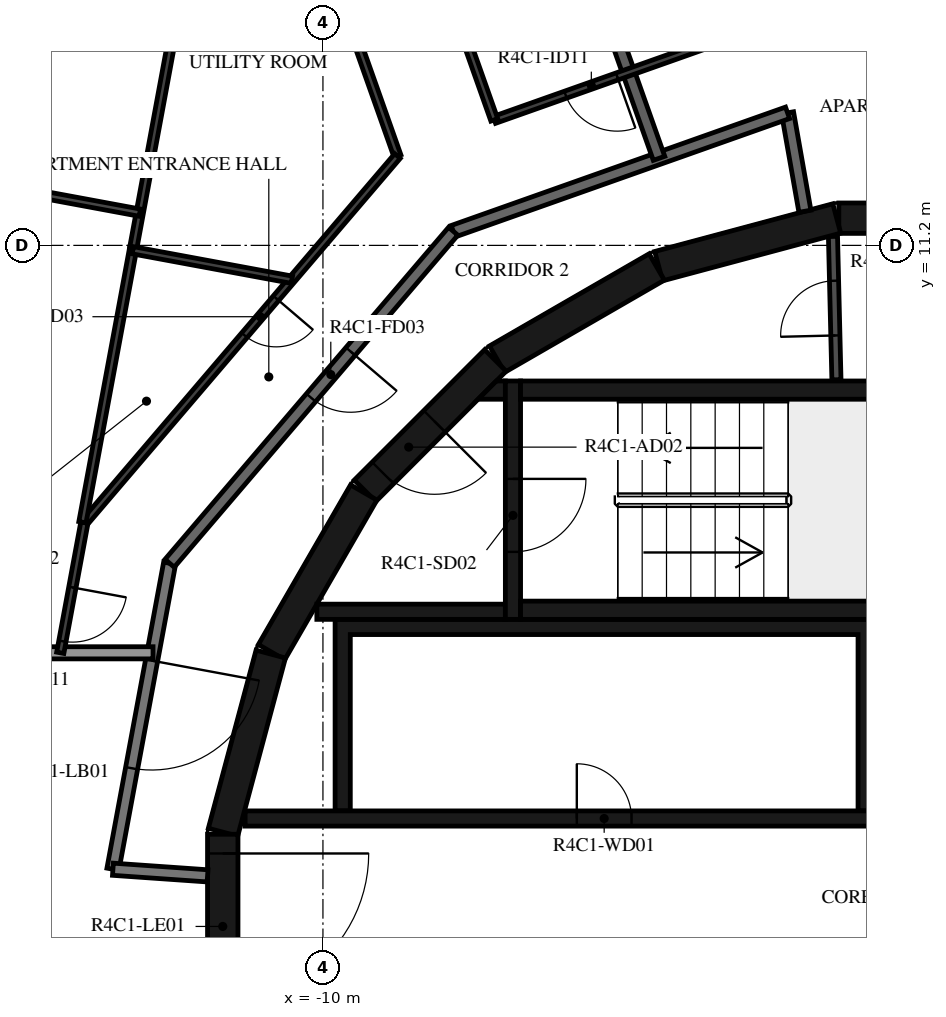
"""IFC4 building model, lengths in metres.
Left out: names, types, materials, properties, quantities, classifications, styles, units other than length and angle.
Written with IfcOpenShell. Run it as: python <this file> out.ifc"""

import sys

from ifc_helpers import new_model, si_unit, direction, frame, frame_2d, origin, place, context, subcontext, project, spatial, polyline, rectangle, outline, extrude, element, fill, save


model = new_model("IFC4")
c1 = context("Model", 3, precision=1e-05, world=origin(), true_north=direction((0.0, 1.0)))
c2 = subcontext(c1, "Body", "Model", "MODEL_VIEW")
j1 = project(units=[si_unit("LENGTHUNIT", "METRE"), si_unit("PLANEANGLEUNIT", "RADIAN")], contexts=[c1])
p1 = place(None, origin())
s1 = spatial("IfcSite", under=j1, at=p1, CompositionType="ELEMENT")
p2 = place(p1, origin())
s2 = spatial("IfcBuilding", under=s1, at=p2, CompositionType="ELEMENT")
p3 = place(p2, frame((0.0, 0.0, 176.2)))
s3 = spatial("IfcBuildingStorey", under=s2, at=p3, CompositionType="ELEMENT", Elevation=176.2)
for number, where, z_axis, x_axis in (
    (1, (1.516, 11.647, 0.0), (0.0, 0.0, 1.0), (-1.0, 0.0, 0.0)),
    (2, (-1.55, 11.643, 0.0), (0.0, 0.0, 1.0), (-0.966, -0.259, 0.0)),
    (3, (-4.51, 10.845, 0.0), (0.0, 0.0, 1.0), (-0.866, -0.5, 0.0)),
):
    element("IfcWall", number, at=place(p3, frame(where, z_axis=z_axis, x_axis=x_axis)), inside=s3, PredefinedType="SHEAR", context=c2, shape_type="SweptSolid", body=[
        extrude(rectangle(XDim=3.033, YDim=0.5, at=frame_2d((1.516, 0.0))), origin(), (0.0, 0.0, 1.0), 3.12),
    ])
p4 = place(p3, frame((-7.164, 9.308, 0.0), z_axis=(0.0, 0.0, 1.0), x_axis=(-0.707106781187, -0.707106781187, 0.0)))
e4 = element("IfcWall", 4, at=p4, inside=s3, PredefinedType="SHEAR", context=c2, shape_type="SweptSolid", body=[
    extrude(rectangle(XDim=3.032, YDim=0.5, at=frame_2d((1.516, 0.0))), origin(), (0.0, 0.0, 1.0), 3.12),
])
p5 = place(p4, frame((1.416, 0.0, 0.0)))
e5 = element("IfcOpeningElement", 5, at=p5, cuts=e4, PredefinedType="OPENING", context=c2, shape_type="SweptSolid", body=[
    extrude(rectangle(XDim=1.2, YDim=2.1, at=frame_2d((0.6, 1.05))), frame((0.0, 0.26, 0.0), z_axis=(0.0, -1.0, 0.0), x_axis=(1.0, 0.0, 0.0)), (0.0, 0.0, 1.0), 0.52),
])
for number, where, z_axis, x_axis in (
    (6, (-9.329, 7.137, 0.0), (0.0, 0.0, 1.0), (-0.5, -0.866, 0.0)),
    (7, (-10.858, 4.479, 0.0), (0.0, 0.0, 1.0), (-0.259, -0.966, 0.0)),
):
    element("IfcWall", number, at=place(p3, frame(where, z_axis=z_axis, x_axis=x_axis)), inside=s3, PredefinedType="SHEAR", context=c2, shape_type="SweptSolid", body=[
        extrude(rectangle(XDim=3.033, YDim=0.5, at=frame_2d((1.516, 0.0))), origin(), (0.0, 0.0, 1.0), 3.12),
    ])
p6 = place(p3, frame((-11.647, 1.516, 0.0), z_axis=(0.0, 0.0, 1.0), x_axis=(0.0, -1.0, 0.0)))
e8 = element("IfcWall", 8, at=p6, inside=s3, PredefinedType="SHEAR", context=c2, shape_type="SweptSolid", body=[
    extrude(rectangle(XDim=3.033, YDim=0.5, at=frame_2d((1.516, 0.0))), origin(), (0.0, 0.0, 1.0), 3.12),
])
p7 = place(p6, frame((0.316, 0.0, 0.0)))
e9 = element("IfcOpeningElement", 9, at=p7, cuts=e8, PredefinedType="OPENING", context=c2, shape_type="SweptSolid", body=[
    extrude(rectangle(XDim=2.4, YDim=2.1, at=frame_2d((1.2, 1.05))), frame((0.0, 0.26, 0.0), z_axis=(0.0, -1.0, 0.0), x_axis=(1.0, 0.0, 0.0)), (0.0, 0.0, 1.0), 0.52),
])
for number, where, z_axis, x_axis in (
    (10, (-6.75, 5.2, 0.0), (0.0, 0.0, 1.0), (1.0, 0.0, 0.0)),
    (11, (-6.75, 8.82, 0.0), (0.0, 0.0, 1.0), (1.0, 0.0, 0.0)),
):
    element("IfcWall", number, at=place(p3, frame(where, z_axis=z_axis, x_axis=x_axis)), inside=s3, PredefinedType="SHEAR", context=c2, shape_type="SweptSolid", body=[
        extrude(rectangle(XDim=6.75, YDim=0.3, at=frame_2d((3.375, 0.0))), origin(), (0.0, 0.0, 1.0), 3.12),
    ])
p8 = place(p3, frame((-6.875, 8.97, 0.0), z_axis=(0.0, 0.0, 1.0), x_axis=(0.0, -1.0, 0.0)))
e12 = element("IfcWall", 12, at=p8, inside=s3, PredefinedType="SHEAR", context=c2, shape_type="SweptSolid", body=[
    extrude(rectangle(XDim=3.92, YDim=0.25, at=frame_2d((1.96, 0.0))), origin(), (0.0, 0.0, 1.0), 3.12),
])
p9 = place(p8, frame((1.61, 0.0, 0.0)))
e13 = element("IfcOpeningElement", 13, at=p9, cuts=e12, PredefinedType="OPENING", context=c2, shape_type="SweptSolid", body=[
    extrude(rectangle(XDim=1.2, YDim=2.1, at=frame_2d((0.6, 1.05))), frame((0.0, 0.135, 0.0), z_axis=(0.0, -1.0, 0.0), x_axis=(1.0, 0.0, 0.0)), (0.0, 0.0, 1.0), 0.27),
])
p10 = place(p3, frame((-7.0, 5.175, 0.0), z_axis=(0.0, 0.0, 1.0), x_axis=(-1.0, 0.0, 0.0)))
e14 = element("IfcWall", 14, at=p10, inside=s3, PredefinedType="SHEAR", context=c2, shape_type="SweptSolid", body=[
    extrude(rectangle(XDim=3.1, YDim=0.25, at=frame_2d((1.55, 0.0))), origin(), (0.0, 0.0, 1.0), 3.12),
])
p11 = place(p3, origin())
e15 = element("IfcWall", 15, at=p11, inside=s3, PredefinedType="SHEAR", context=c2, shape_type="SweptSolid", body=[
    extrude(outline(polyline([(-7.148, 8.97), (-7.0, 8.97), (-7.0, 8.67), (-7.448, 8.67), (-7.148, 8.97)])), origin(), (0.0, 0.0, 1.0), 3.12),
])
p12 = place(p3, origin())
e16 = element("IfcWall", 16, at=p12, inside=s3, PredefinedType="SHEAR", context=c2, shape_type="SweptSolid", body=[
    extrude(outline(polyline([(-9.55, 4.8), (-1.2, 4.8), (-1.2, 1.9), (-0.95, 1.9), (-0.95, 4.8), (0.95, 4.8), (0.95, 1.9), (1.2, 1.9), (1.2, 4.8), (3.1, 4.8), (3.1, 1.9), (3.35, 1.9), (3.35, 4.8), (5.25, 4.8), (5.25, 1.9), (5.5, 1.9), (5.5, 4.8), (7.4, 4.8), (7.4, 1.9), (7.65, 1.9), (7.65, 4.8), (9.55, 4.8), (9.55, 1.9), (9.8, 1.9), (9.8, 4.8), (9.8, 5.05), (-9.8, 5.05), (-9.8, 4.8), (-9.8, 1.9), (-9.55, 1.9), (-9.55, 4.8)])), origin(), (0.0, 0.0, 1.0), 3.12),
])
p13 = place(p3, frame((-11.28, 1.775, 0.0), z_axis=(0.0, 0.0, 1.0), x_axis=(1.0, 0.0, 0.0)))
e17 = element("IfcWall", 17, at=p13, inside=s3, PredefinedType="SHEAR", context=c2, shape_type="SweptSolid", body=[
    extrude(rectangle(XDim=14.38, YDim=0.25, at=frame_2d((7.19, 0.0))), origin(), (0.0, 0.0, 1.0), 3.12),
])
p14 = place(p13, frame((10.73, 0.0, 0.0)))
e18 = element("IfcOpeningElement", 18, at=p14, cuts=e17, PredefinedType="OPENING", context=c2, shape_type="SweptSolid", body=[
    extrude(rectangle(XDim=1.1, YDim=2.1, at=frame_2d((0.55, 1.05))), frame((0.0, 0.135, 0.0), z_axis=(0.0, -1.0, 0.0), x_axis=(1.0, 0.0, 0.0)), (0.0, 0.0, 1.0), 0.27),
])
p15 = place(p13, frame((12.88, 0.0, 0.0)))
e19 = element("IfcOpeningElement", 19, at=p15, cuts=e17, PredefinedType="OPENING", context=c2, shape_type="SweptSolid", body=[
    extrude(rectangle(XDim=1.1, YDim=2.1, at=frame_2d((0.55, 1.05))), frame((0.0, 0.135, 0.0), z_axis=(0.0, -1.0, 0.0), x_axis=(1.0, 0.0, 0.0)), (0.0, 0.0, 1.0), 0.27),
])
p16 = place(p13, frame((5.455, 0.0, 0.0)))
e20 = element("IfcOpeningElement", 20, at=p16, cuts=e17, PredefinedType="OPENING", context=c2, shape_type="SweptSolid", body=[
    extrude(rectangle(XDim=0.9, YDim=2.1, at=frame_2d((0.45, 1.05))), frame((0.0, 0.135, 0.0), z_axis=(0.0, -1.0, 0.0), x_axis=(1.0, 0.0, 0.0)), (0.0, 0.0, 1.0), 0.27),
])
p17 = place(p3, frame((-1.555, 8.99, 0.0), z_axis=(0.0, 0.0, 1.0), x_axis=(-0.024125549686, 0.999708936567, 0.0)))
e21 = element("IfcWall", 21, at=p17, inside=s3, PredefinedType="PARTITIONING", context=c2, shape_type="SweptSolid", body=[
    extrude(rectangle(XDim=2.358, YDim=0.15, at=frame_2d((1.179, 0.0))), origin(), (0.0, 0.0, 1.0), 3.12),
])
p18 = place(p17, frame((0.729, 0.0, 0.0)))
e22 = element("IfcOpeningElement", 22, at=p18, cuts=e21, PredefinedType="OPENING", context=c2, shape_type="SweptSolid", body=[
    extrude(rectangle(XDim=0.9, YDim=2.1, at=frame_2d((0.45, 1.05))), frame((0.0, 0.085, 0.0), z_axis=(0.0, -1.0, 0.0), x_axis=(1.0, 0.0, 0.0)), (0.0, 0.0, 1.0), 0.17),
])
p19 = place(p3, frame((-12.521, 5.972, 0.0), z_axis=(0.0, 0.0, 1.0), x_axis=(-0.182251559718, -0.983251935661, 0.0)))
e23 = element("IfcWall", 23, at=p19, inside=s3, PredefinedType="STANDARD", context=c2, shape_type="SweptSolid", body=[
    extrude(rectangle(XDim=5.117, YDim=0.2, at=frame_2d((2.559, 0.0))), origin(), (0.0, 0.0, 1.0), 3.12),
])
p20 = place(p19, frame((1.627, 0.0, 0.0)))
e24 = element("IfcOpeningElement", 24, at=p20, cuts=e23, PredefinedType="OPENING", context=c2, shape_type="SweptSolid", body=[
    extrude(rectangle(XDim=1.8, YDim=2.1, at=frame_2d((0.9, 1.05))), frame((0.0, 0.11, 0.0), z_axis=(0.0, -1.0, 0.0), x_axis=(1.0, 0.0, 0.0)), (0.0, 0.0, 1.0), 0.22),
])
p21 = place(p3, frame((-13.454, 0.941, 0.0), z_axis=(0.0, 0.0, 1.0), x_axis=(0.99755155062, -0.069934997354, 0.0)))
e25 = element("IfcWall", 25, at=p21, inside=s3, PredefinedType="STANDARD", context=c2, shape_type="SweptSolid", body=[
    extrude(rectangle(XDim=1.561, YDim=0.2, at=frame_2d((0.78, 0.0))), origin(), (0.0, 0.0, 1.0), 3.12),
])
p22 = place(p3, frame((-2.074, 11.761, 0.0), z_axis=(0.0, 0.0, 1.0), x_axis=(-0.1736412798, 0.984808969267, 0.0)))
e26 = element("IfcWall", 26, at=p22, inside=s3, PredefinedType="STANDARD", context=c2, shape_type="SweptSolid", body=[
    extrude(rectangle(XDim=1.644, YDim=0.2, at=frame_2d((0.822, 0.0))), origin(), (0.0, 0.0, 1.0), 3.12),
])
p23 = place(p3, frame((-2.359, 13.38, 0.0), z_axis=(0.0, 0.0, 1.0), x_axis=(-0.942647529236, -0.333789807551, 0.0)))
e27 = element("IfcWall", 27, at=p23, inside=s3, PredefinedType="STANDARD", context=c2, shape_type="SweptSolid", body=[
    extrude(rectangle(XDim=5.833, YDim=0.2, at=frame_2d((2.917, 0.0))), origin(), (0.0, 0.0, 1.0), 3.12),
])
p24 = place(p3, frame((-7.858, 11.433, 0.0), z_axis=(0.0, 0.0, 1.0), x_axis=(-0.649440801937, -0.760412154545, 0.0)))
e28 = element("IfcWall", 28, at=p24, inside=s3, PredefinedType="STANDARD", context=c2, shape_type="SweptSolid", body=[
    extrude(rectangle(XDim=7.181, YDim=0.2, at=frame_2d((3.59, 0.0))), origin(), (0.0, 0.0, 1.0), 3.12),
])
p25 = place(p24, frame((2.6, 0.0, 0.0)))
e29 = element("IfcOpeningElement", 29, at=p25, cuts=e28, PredefinedType="OPENING", context=c2, shape_type="SweptSolid", body=[
    extrude(rectangle(XDim=1.0, YDim=2.1, at=frame_2d((0.5, 1.05))), frame((0.0, 0.11, 0.0), z_axis=(0.0, -1.0, 0.0), x_axis=(1.0, 0.0, 0.0)), (0.0, 0.0, 1.0), 0.22),
])
p26 = place(p3, frame((-12.794, 4.5, 0.0), z_axis=(0.0, 0.0, 1.0), x_axis=(-1.0, 0.0, 0.0)))
e30 = element("IfcWall", 30, at=p26, inside=s3, PredefinedType="STANDARD", context=c2, shape_type="SweptSolid", body=[
    extrude(rectangle(XDim=5.106, YDim=0.2, at=frame_2d((2.553, 0.0))), origin(), (0.0, 0.0, 1.0), 2.73),
])
p27 = place(p3, frame((-5.839, 16.488, 0.0), z_axis=(0.0, 0.0, 1.0), x_axis=(0.333840515054, -0.942629572265, 0.0)))
e31 = element("IfcWall", 31, at=p27, inside=s3, PredefinedType="STANDARD", context=c2, shape_type="SweptSolid", body=[
    extrude(rectangle(XDim=4.092, YDim=0.2, at=frame_2d((2.046, 0.0))), origin(), (0.0, 0.0, 1.0), 3.12),
])
p28 = place(p3, frame((8.702, 12.206, 0.0), z_axis=(0.0, 0.0, 1.0), x_axis=(-0.760401313718, 0.649453494945, 0.0)))
e32 = element("IfcWall", 32, at=p28, inside=s3, PredefinedType="PARTITIONING", context=c2, shape_type="SweptSolid", body=[
    extrude(rectangle(XDim=16.724, YDim=0.12, at=frame_2d((8.362, 0.0))), origin(), (0.0, 0.0, 1.0), 3.12),
])
p29 = place(p28, frame((0.2, 0.0, 0.0)))
e33 = element("IfcOpeningElement", 33, at=p29, cuts=e32, PredefinedType="OPENING", context=c2, shape_type="SweptSolid", body=[
    extrude(rectangle(XDim=0.9, YDim=2.1, at=frame_2d((0.45, 1.05))), frame((0.0, 0.07, 0.0), z_axis=(0.0, -1.0, 0.0), x_axis=(1.0, 0.0, 0.0)), (0.0, 0.0, 1.0), 0.14),
])
p30 = place(p28, frame((8.02, 0.0, 0.0)))
e34 = element("IfcOpeningElement", 34, at=p30, cuts=e32, PredefinedType="OPENING", context=c2, shape_type="SweptSolid", body=[
    extrude(rectangle(XDim=0.9, YDim=2.1, at=frame_2d((0.45, 1.05))), frame((0.0, 0.07, 0.0), z_axis=(0.0, -1.0, 0.0), x_axis=(1.0, 0.0, 0.0)), (0.0, 0.0, 1.0), 0.14),
])
p31 = place(p28, frame((14.412, 0.0, 0.0)))
e35 = element("IfcOpeningElement", 35, at=p31, cuts=e32, PredefinedType="OPENING", context=c2, shape_type="SweptSolid", body=[
    extrude(rectangle(XDim=0.9, YDim=2.1, at=frame_2d((0.45, 1.05))), frame((0.0, 0.07, 0.0), z_axis=(0.0, -1.0, 0.0), x_axis=(1.0, 0.0, 0.0)), (0.0, 0.0, 1.0), 0.14),
])
p32 = place(p3, frame((6.641, 13.923, 0.0), z_axis=(0.0, 0.0, 1.0), x_axis=(-0.983250157272, 0.182261153912, 0.0)))
e36 = element("IfcWall", 36, at=p32, inside=s3, PredefinedType="PARTITIONING", context=c2, shape_type="SweptSolid", body=[
    extrude(rectangle(XDim=7.985, YDim=0.12, at=frame_2d((3.992, 0.0))), origin(), (0.0, 0.0, 1.0), 3.12),
])
p33 = place(p32, frame((1.4, 0.0, 0.0)))
e37 = element("IfcOpeningElement", 37, at=p33, cuts=e36, PredefinedType="OPENING", context=c2, shape_type="SweptSolid", body=[
    extrude(rectangle(XDim=0.8, YDim=2.1, at=frame_2d((0.4, 1.05))), frame((0.0, 0.07, 0.0), z_axis=(0.0, -1.0, 0.0), x_axis=(1.0, 0.0, 0.0)), (0.0, 0.0, 1.0), 0.14),
])
p34 = place(p32, frame((5.069, 0.0, 0.0)))
e38 = element("IfcOpeningElement", 38, at=p34, cuts=e36, PredefinedType="OPENING", context=c2, shape_type="SweptSolid", body=[
    extrude(rectangle(XDim=0.9, YDim=2.1, at=frame_2d((0.45, 1.05))), frame((0.0, 0.07, 0.0), z_axis=(0.0, -1.0, 0.0), x_axis=(1.0, 0.0, 0.0)), (0.0, 0.0, 1.0), 0.14),
])
p35 = place(p3, frame((-2.852, 14.797, 0.0), z_axis=(0.0, 0.0, 1.0), x_axis=(-0.942629664375, -0.333840254973, 0.0)))
e39 = element("IfcWall", 39, at=p35, inside=s3, PredefinedType="PARTITIONING", context=c2, shape_type="SweptSolid", body=[
    extrude(rectangle(XDim=4.593, YDim=0.12, at=frame_2d((2.297, 0.0))), origin(), (0.0, 0.0, 1.0), 3.12),
])
p36 = place(p35, frame((2.451, 0.0, 0.0)))
e40 = element("IfcOpeningElement", 40, at=p36, cuts=e39, PredefinedType="OPENING", context=c2, shape_type="SweptSolid", body=[
    extrude(rectangle(XDim=0.9, YDim=2.1, at=frame_2d((0.45, 1.05))), frame((0.0, 0.07, 0.0), z_axis=(0.0, -1.0, 0.0), x_axis=(1.0, 0.0, 0.0)), (0.0, 0.0, 1.0), 0.14),
])
p37 = place(p3, frame((-7.181, 13.263, 0.0), z_axis=(0.0, 0.0, 1.0), x_axis=(-0.333822798183, 0.942635846663, 0.0)))
e41 = element("IfcWall", 41, at=p37, inside=s3, PredefinedType="PARTITIONING", context=c2, shape_type="SweptSolid", body=[
    extrude(rectangle(XDim=3.527, YDim=0.12, at=frame_2d((1.764, 0.0))), origin(), (0.0, 0.0, 1.0), 3.12),
])
p38 = place(p3, frame((-9.961, 16.021, 0.0), z_axis=(0.0, 0.0, 1.0), x_axis=(0.333803930912, -0.94264252806, 0.0)))
e42 = element("IfcWall", 42, at=p38, inside=s3, PredefinedType="PARTITIONING", context=c2, shape_type="SweptSolid", body=[
    extrude(rectangle(XDim=3.556, YDim=0.12, at=frame_2d((1.778, 0.0))), origin(), (0.0, 0.0, 1.0), 3.12),
])
p39 = place(p3, frame((-8.774, 12.669, 0.0), z_axis=(0.0, 0.0, 1.0), x_axis=(-0.649446157105, -0.760407580855, 0.0)))
e43 = element("IfcWall", 43, at=p39, inside=s3, PredefinedType="PARTITIONING", context=c2, shape_type="SweptSolid", body=[
    extrude(rectangle(XDim=7.927, YDim=0.12, at=frame_2d((3.964, 0.0))), origin(), (0.0, 0.0, 1.0), 3.12),
])
p40 = place(p39, frame((3.074, 0.0, 0.0)))
e44 = element("IfcOpeningElement", 44, at=p40, cuts=e43, PredefinedType="OPENING", context=c2, shape_type="SweptSolid", body=[
    extrude(rectangle(XDim=0.8, YDim=2.1, at=frame_2d((0.4, 1.05))), frame((0.0, 0.07, 0.0), z_axis=(0.0, -1.0, 0.0), x_axis=(1.0, 0.0, 0.0)), (0.0, 0.0, 1.0), 0.14),
])
p41 = place(p3, frame((-13.923, 6.641, 0.0), z_axis=(0.0, 0.0, 1.0), x_axis=(-0.182209715759, -0.983259690765, 0.0)))
e45 = element("IfcWall", 45, at=p41, inside=s3, PredefinedType="PARTITIONING", context=c2, shape_type="SweptSolid", body=[
    extrude(rectangle(XDim=2.177, YDim=0.12, at=frame_2d((1.089, 0.0))), origin(), (0.0, 0.0, 1.0), 3.12),
])
p42 = place(p41, frame((1.083, 0.0, 0.0)))
e46 = element("IfcOpeningElement", 46, at=p42, cuts=e45, PredefinedType="OPENING", context=c2, shape_type="SweptSolid", body=[
    extrude(rectangle(XDim=0.9, YDim=2.1, at=frame_2d((0.45, 1.05))), frame((0.0, 0.07, 0.0), z_axis=(0.0, -1.0, 0.0), x_axis=(1.0, 0.0, 0.0)), (0.0, 0.0, 1.0), 0.14),
])
p43 = place(p3, frame((-13.955, 6.647, 0.0), z_axis=(0.0, 0.0, 1.0), x_axis=(0.182264522222, 0.983249532896, 0.0)))
e47 = element("IfcWall", 47, at=p43, inside=s3, PredefinedType="PARTITIONING", context=c2, shape_type="SweptSolid", body=[
    extrude(rectangle(XDim=4.589, YDim=0.12, at=frame_2d((2.294, 0.0))), origin(), (0.0, 0.0, 1.0), 3.12),
])
p44 = place(p3, frame((-11.396, 20.453, 0.0), z_axis=(0.0, 0.0, 1.0), x_axis=(-0.182223370439, -0.983257160292, 0.0)))
e48 = element("IfcWall", 48, at=p44, inside=s3, PredefinedType="PARTITIONING", context=c2, shape_type="SweptSolid", body=[
    extrude(rectangle(XDim=9.452, YDim=0.12, at=frame_2d((4.726, 0.0))), origin(), (0.0, 0.0, 1.0), 3.12),
])
p45 = place(p44, frame((3.319, 0.0, 0.0)))
e49 = element("IfcOpeningElement", 49, at=p45, cuts=e48, PredefinedType="OPENING", context=c2, shape_type="SweptSolid", body=[
    extrude(rectangle(XDim=0.9, YDim=2.1, at=frame_2d((0.45, 1.05))), frame((0.0, 0.07, 0.0), z_axis=(0.0, -1.0, 0.0), x_axis=(1.0, 0.0, 0.0)), (0.0, 0.0, 1.0), 0.14),
])
p46 = place(p44, frame((0.2, 0.0, 0.0)))
e50 = element("IfcOpeningElement", 50, at=p46, cuts=e48, PredefinedType="OPENING", context=c2, shape_type="SweptSolid", body=[
    extrude(rectangle(XDim=0.9, YDim=2.1, at=frame_2d((0.45, 1.05))), frame((0.0, 0.07, 0.0), z_axis=(0.0, -1.0, 0.0), x_axis=(1.0, 0.0, 0.0)), (0.0, 0.0, 1.0), 0.14),
])
p47 = place(p3, frame((-13.126, 11.12, 0.0), z_axis=(0.0, 0.0, 1.0), x_axis=(0.983257646361, -0.182220747645, 0.0)))
e51 = element("IfcWall", 51, at=p47, inside=s3, PredefinedType="PARTITIONING", context=c2, shape_type="SweptSolid", body=[
    extrude(rectangle(XDim=2.659, YDim=0.12, at=frame_2d((1.33, 0.0))), origin(), (0.0, 0.0, 1.0), 3.12),
])
p48 = place(p3, frame((-16.552, 12.394, 0.0), z_axis=(0.0, 0.0, 1.0), x_axis=(0.983257712156, -0.182220392618, 0.0)))
e52 = element("IfcWall", 52, at=p48, inside=s3, PredefinedType="PARTITIONING", context=c2, shape_type="SweptSolid", body=[
    extrude(rectangle(XDim=3.6, YDim=0.12, at=frame_2d((1.8, 0.0))), origin(), (0.0, 0.0, 1.0), 2.73),
])
p49 = place(p9, origin())
e53 = element("IfcDoor", 53, at=p49, inside=s3, OperationType="SINGLE_SWING_LEFT", PredefinedType="DOOR", context=c2, shape_type="SweptSolid", body=[
    extrude(rectangle(XDim=1.2, YDim=2.1, at=frame_2d((0.6, 1.05))), frame((0.0, 0.025, 0.0), z_axis=(0.0, -1.0, 0.0), x_axis=(1.0, 0.0, 0.0)), (0.0, 0.0, 1.0), 0.05),
])
fill(e13, e53)
p50 = place(p5, origin())
e54 = element("IfcDoor", 54, at=p50, inside=s3, OperationType="SINGLE_SWING_RIGHT", PredefinedType="DOOR", context=c2, shape_type="SweptSolid", body=[
    extrude(rectangle(XDim=1.2, YDim=2.1, at=frame_2d((0.6, 1.05))), frame((0.0, 0.025, 0.0), z_axis=(0.0, -1.0, 0.0), x_axis=(1.0, 0.0, 0.0)), (0.0, 0.0, 1.0), 0.05),
])
fill(e5, e54)
p51 = place(p7, origin())
e55 = element("IfcDoor", 55, at=p51, inside=s3, OperationType="DOUBLE_DOOR_SINGLE_SWING", PredefinedType="DOOR", context=c2, shape_type="SweptSolid", body=[
    extrude(rectangle(XDim=2.4, YDim=2.1, at=frame_2d((1.2, 1.05))), frame((0.0, 0.025, 0.0), z_axis=(0.0, -1.0, 0.0), x_axis=(1.0, 0.0, 0.0)), (0.0, 0.0, 1.0), 0.05),
])
fill(e9, e55)
p52 = place(p16, origin())
e56 = element("IfcDoor", 56, at=p52, inside=s3, OperationType="SINGLE_SWING_LEFT", PredefinedType="DOOR", context=c2, shape_type="SweptSolid", body=[
    extrude(rectangle(XDim=0.9, YDim=2.1, at=frame_2d((0.45, 1.05))), frame((0.0, 0.025, 0.0), z_axis=(0.0, -1.0, 0.0), x_axis=(1.0, 0.0, 0.0)), (0.0, 0.0, 1.0), 0.05),
])
fill(e20, e56)
p53 = place(p18, origin())
e57 = element("IfcDoor", 57, at=p53, inside=s3, OperationType="SINGLE_SWING_RIGHT", PredefinedType="DOOR", context=c2, shape_type="SweptSolid", body=[
    extrude(rectangle(XDim=0.9, YDim=2.1, at=frame_2d((0.45, 1.05))), frame((0.0, 0.025, 0.0), z_axis=(0.0, -1.0, 0.0), x_axis=(1.0, 0.0, 0.0)), (0.0, 0.0, 1.0), 0.05),
])
fill(e22, e57)
p54 = place(p25, origin())
e58 = element("IfcDoor", 58, at=p54, inside=s3, OperationType="SINGLE_SWING_LEFT", PredefinedType="DOOR", context=c2, shape_type="SweptSolid", body=[
    extrude(rectangle(XDim=1.0, YDim=2.1, at=frame_2d((0.5, 1.05))), frame((0.0, 0.025, 0.0), z_axis=(0.0, -1.0, 0.0), x_axis=(1.0, 0.0, 0.0)), (0.0, 0.0, 1.0), 0.05),
])
fill(e29, e58)
p55 = place(p36, origin())
e59 = element("IfcDoor", 59, at=p55, inside=s3, OperationType="SINGLE_SWING_LEFT", PredefinedType="DOOR", context=c2, shape_type="SweptSolid", body=[
    extrude(rectangle(XDim=0.9, YDim=2.1, at=frame_2d((0.45, 1.05))), frame((0.0, 0.025, 0.0), z_axis=(0.0, -1.0, 0.0), x_axis=(1.0, 0.0, 0.0)), (0.0, 0.0, 1.0), 0.05),
])
fill(e40, e59)
p56 = place(p40, origin())
e60 = element("IfcDoor", 60, at=p56, inside=s3, OperationType="SINGLE_SWING_LEFT", PredefinedType="DOOR", context=c2, shape_type="SweptSolid", body=[
    extrude(rectangle(XDim=0.8, YDim=2.1, at=frame_2d((0.4, 1.05))), frame((0.0, 0.025, 0.0), z_axis=(0.0, -1.0, 0.0), x_axis=(1.0, 0.0, 0.0)), (0.0, 0.0, 1.0), 0.05),
])
fill(e44, e60)
p57 = place(p42, origin())
e61 = element("IfcDoor", 61, at=p57, inside=s3, OperationType="SINGLE_SWING_LEFT", PredefinedType="DOOR", context=c2, shape_type="SweptSolid", body=[
    extrude(rectangle(XDim=0.9, YDim=2.1, at=frame_2d((0.45, 1.05))), frame((0.0, 0.025, 0.0), z_axis=(0.0, -1.0, 0.0), x_axis=(1.0, 0.0, 0.0)), (0.0, 0.0, 1.0), 0.05),
])
fill(e46, e61)
p58 = place(p20, origin())
e62 = element("IfcDoor", 62, at=p58, inside=s3, OperationType="DOUBLE_DOOR_SINGLE_SWING", PredefinedType="DOOR", context=c2, shape_type="SweptSolid", body=[
    extrude(rectangle(XDim=1.8, YDim=2.1, at=frame_2d((0.9, 1.05))), frame((0.0, 0.025, 0.0), z_axis=(0.0, -1.0, 0.0), x_axis=(1.0, 0.0, 0.0)), (0.0, 0.0, 1.0), 0.05),
])
fill(e24, e62)
save(model, sys.argv[1])
